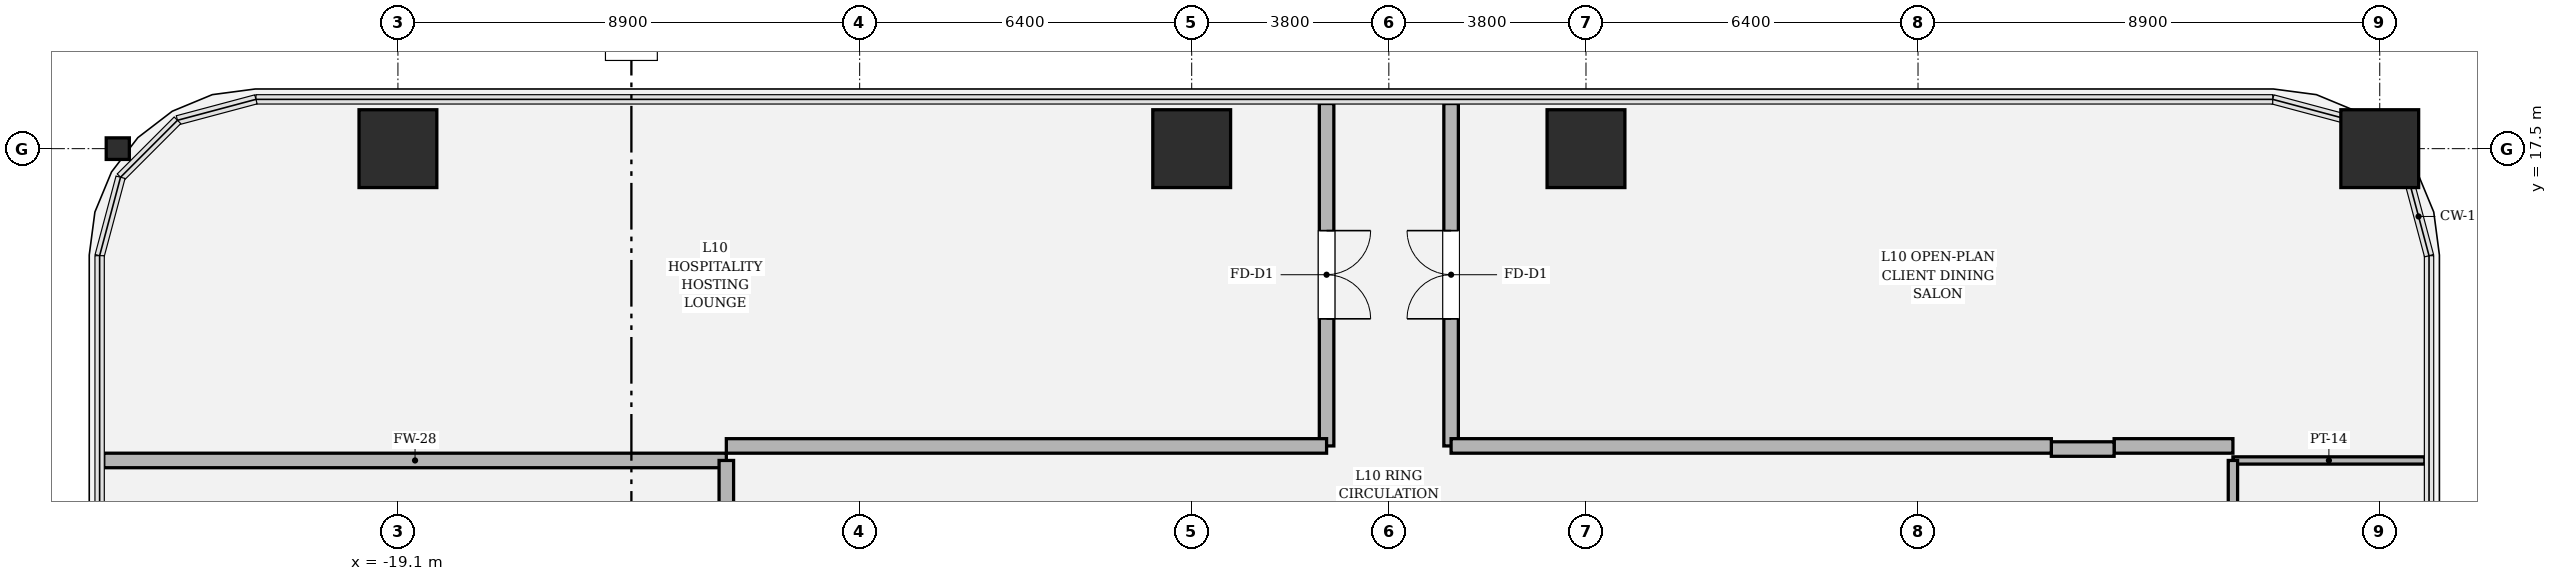
"""IFC4 building model, lengths in metres.
Left out: names, types, materials, properties, quantities, classifications, styles, units other than length and angle.
Written with IfcOpenShell. Run it as: python <this file> out.ifc"""

import sys

from ifc_helpers import new_model, si_unit, direction, frame, frame_2d, origin, origin_2d, place, context, subcontext, project, spatial, rectangle, hollow_rectangle, i_section, extrude, element, fill, save


model = new_model("IFC4")
c1 = context("Model", 3, precision=1e-05, world=origin(), true_north=direction((0.0, 1.0)))
c2 = subcontext(c1, "Body", "Model", "MODEL_VIEW")
j1 = project(units=[si_unit("LENGTHUNIT", "METRE"), si_unit("PLANEANGLEUNIT", "RADIAN")], contexts=[c1])
p1 = place(None, origin())
s1 = spatial("IfcSite", under=j1, at=p1, CompositionType="ELEMENT")
p2 = place(p1, origin())
s2 = spatial("IfcBuilding", under=s1, at=p2, CompositionType="ELEMENT")
p3 = place(p2, frame((0.0, 0.0, 48.45)))
s3 = spatial("IfcBuildingStorey", under=s2, at=p3, CompositionType="ELEMENT", Elevation=48.45)
for number, where, z_axis, x_axis in (
    (1, (19.1, 17.5, 0.0), (0.0, 0.0, 1.0), (1.0, 0.0, 0.0)),
    (2, (3.8, 17.5, 0.0), (0.0, 0.0, 1.0), (1.0, 0.0, 0.0)),
    (3, (-3.8, 17.5, 0.0), (0.0, 0.0, 1.0), (1.0, 0.0, 0.0)),
    (4, (-19.1, 17.5, 0.0), (0.0, 0.0, 1.0), (1.0, 0.0, 0.0)),
):
    element("IfcColumn", number, at=place(p3, frame(where, z_axis=z_axis, x_axis=x_axis)), inside=s3, PredefinedType="COLUMN", context=c2, shape_type="SweptSolid", body=[
        extrude(hollow_rectangle(XDim=1.5, YDim=1.5, WallThickness=0.045, at=origin_2d()), origin(), (0.0, 0.0, 1.0), 4.05),
    ])
p4 = place(p3, frame((-24.5, 17.5, 0.0), z_axis=(0.0, 0.0, 1.0), x_axis=(0.0, 1.0, 0.0)))
e5 = element("IfcColumn", 5, at=p4, inside=s3, PredefinedType="COLUMN", context=c2, shape_type="SweptSolid", body=[
    extrude(i_section(OverallWidth=0.416, OverallDepth=0.446, WebThickness=0.039, FlangeThickness=0.062, FilletRadius=0.018, at=origin_2d()), origin(), (0.0, 0.0, 1.0), 4.048),
])
p5 = place(p3, frame((16.27, 11.49, 0.0), z_axis=(0.0, 0.0, 1.0), x_axis=(1.0, 0.0, 0.0)))
e6 = element("IfcWall", 6, at=p5, inside=s3, PredefinedType="PARTITIONING", context=c2, shape_type="SweptSolid", body=[
    extrude(rectangle(XDim=3.7, YDim=0.14, at=frame_2d((1.85, 0.0))), origin(), (0.0, 0.0, 1.0), 3.104),
])
p6 = place(p3, frame((16.27, -3.174, 0.0), z_axis=(0.0, 0.0, 1.0), x_axis=(0.0, 1.0, 0.0)))
e7 = element("IfcWall", 7, at=p6, inside=s3, PredefinedType="PARTITIONING", context=c2, shape_type="SweptSolid", body=[
    extrude(rectangle(XDim=14.664, YDim=0.18, at=frame_2d((7.332, 0.0))), origin(), (0.0, 0.0, 1.0), 3.104),
])
p7 = place(p6, frame((6.807, 0.0, 0.0)))
e8 = element("IfcOpeningElement", 8, at=p7, cuts=e7, PredefinedType="OPENING", context=c2, shape_type="SweptSolid", body=[
    extrude(rectangle(XDim=1.05, YDim=2.2, at=frame_2d((0.525, 1.1))), frame((0.0, 0.1, 0.0), z_axis=(0.0, -1.0, 0.0), x_axis=(1.0, 0.0, 0.0)), (0.0, 0.0, 1.0), 0.2),
])
p8 = place(p3, frame((-24.77, 11.49, 0.0), z_axis=(0.0, 0.0, 1.0), x_axis=(1.0, 0.0, 0.0)))
e9 = element("IfcWall", 9, at=p8, inside=s3, PredefinedType="SOLIDWALL", context=c2, shape_type="SweptSolid", body=[
    extrude(rectangle(XDim=12.0, YDim=0.28, at=frame_2d((6.0, 0.0))), origin(), (0.0, 0.0, 1.0), 2.524),
])
p9 = place(p3, frame((-12.77, 11.49, 0.0), z_axis=(0.0, 0.0, 1.0), x_axis=(0.0, -1.0, 0.0)))
e10 = element("IfcWall", 10, at=p9, inside=s3, PredefinedType="SOLIDWALL", context=c2, shape_type="SweptSolid", body=[
    extrude(rectangle(XDim=7.272, YDim=0.28, at=frame_2d((3.636, 0.0))), origin(), (0.0, 0.0, 1.0), 3.104),
])
p10 = place(p9, frame((2.786, 0.0, 0.0)))
e11 = element("IfcOpeningElement", 11, at=p10, cuts=e10, PredefinedType="OPENING", context=c2, shape_type="SweptSolid", body=[
    extrude(rectangle(XDim=1.7, YDim=2.3, at=frame_2d((0.85, 1.15))), frame((0.0, 0.15, 0.0), z_axis=(0.0, -1.0, 0.0), x_axis=(1.0, 0.0, 0.0)), (0.0, 0.0, 1.0), 0.3),
])
p11 = place(p3, frame((-1.2, 18.37, 0.0), z_axis=(0.0, 0.0, 1.0), x_axis=(0.0, -1.0, 0.0)))
e12 = element("IfcWall", 12, at=p11, inside=s3, PredefinedType="SOLIDWALL", context=c2, shape_type="SweptSolid", body=[
    extrude(rectangle(XDim=6.6, YDim=0.28, at=frame_2d((3.3, 0.0))), origin(), (0.0, 0.0, 1.0), 3.104),
])
p12 = place(p11, frame((2.45, 0.0, 0.0)))
e13 = element("IfcOpeningElement", 13, at=p12, cuts=e12, PredefinedType="OPENING", context=c2, shape_type="SweptSolid", body=[
    extrude(rectangle(XDim=1.7, YDim=2.3, at=frame_2d((0.85, 1.15))), frame((0.0, 0.15, 0.0), z_axis=(0.0, -1.0, 0.0), x_axis=(1.0, 0.0, 0.0)), (0.0, 0.0, 1.0), 0.3),
])
p13 = place(p3, frame((-1.2, 11.77, 0.0), z_axis=(0.0, 0.0, 1.0), x_axis=(-1.0, 0.0, 0.0)))
e14 = element("IfcWall", 14, at=p13, inside=s3, PredefinedType="SOLIDWALL", context=c2, shape_type="SweptSolid", body=[
    extrude(rectangle(XDim=11.57, YDim=0.28, at=frame_2d((5.785, 0.0))), origin(), (0.0, 0.0, 1.0), 3.104),
])
p14 = place(p3, frame((1.2, 11.77, 0.0), z_axis=(0.0, 0.0, 1.0), x_axis=(0.0, 1.0, 0.0)))
e15 = element("IfcWall", 15, at=p14, inside=s3, PredefinedType="SOLIDWALL", context=c2, shape_type="SweptSolid", body=[
    extrude(rectangle(XDim=6.6, YDim=0.28, at=frame_2d((3.3, 0.0))), origin(), (0.0, 0.0, 1.0), 3.104),
])
p15 = place(p14, frame((2.45, 0.0, 0.0)))
e16 = element("IfcOpeningElement", 16, at=p15, cuts=e15, PredefinedType="OPENING", context=c2, shape_type="SweptSolid", body=[
    extrude(rectangle(XDim=1.7, YDim=2.3, at=frame_2d((0.85, 1.15))), frame((0.0, 0.15, 0.0), z_axis=(0.0, -1.0, 0.0), x_axis=(1.0, 0.0, 0.0)), (0.0, 0.0, 1.0), 0.3),
])
p16 = place(p3, frame((16.27, 11.77, 0.0), z_axis=(0.0, 0.0, 1.0), x_axis=(-1.0, 0.0, 0.0)))
e17 = element("IfcWall", 17, at=p16, inside=s3, PredefinedType="SOLIDWALL", context=c2, shape_type="SweptSolid", body=[
    extrude(rectangle(XDim=2.29, YDim=0.28, at=frame_2d((1.145, 0.0))), origin(), (0.0, 0.0, 1.0), 3.354),
])
p17 = place(p3, frame((13.98, 11.71, 0.0), z_axis=(0.0, 0.0, 1.0), x_axis=(-1.0, 0.0, 0.0)))
e18 = element("IfcWall", 18, at=p17, inside=s3, PredefinedType="SOLIDWALL", context=c2, shape_type="SweptSolid", body=[
    extrude(rectangle(XDim=1.21, YDim=0.28, at=frame_2d((0.605, 0.0))), origin(), (0.0, 0.0, 1.0), 3.81),
])
p18 = place(p3, frame((12.77, 11.77, 0.0), z_axis=(0.0, 0.0, 1.0), x_axis=(-1.0, 0.0, 0.0)))
e19 = element("IfcWall", 19, at=p18, inside=s3, PredefinedType="SOLIDWALL", context=c2, shape_type="SweptSolid", body=[
    extrude(rectangle(XDim=11.57, YDim=0.28, at=frame_2d((5.785, 0.0))), origin(), (0.0, 0.0, 1.0), 3.104),
])
p19 = place(p12, origin())
e20 = element("IfcDoor", 20, at=p19, inside=s3, OperationType="DOUBLE_DOOR_SINGLE_SWING", PredefinedType="DOOR", context=c2, shape_type="SweptSolid", body=[
    extrude(rectangle(XDim=1.7, YDim=2.3, at=frame_2d((0.85, 1.15))), frame((0.0, 0.025, 0.0), z_axis=(0.0, -1.0, 0.0), x_axis=(1.0, 0.0, 0.0)), (0.0, 0.0, 1.0), 0.05),
])
fill(e13, e20)
p20 = place(p15, origin())
e21 = element("IfcDoor", 21, at=p20, inside=s3, OperationType="DOUBLE_DOOR_SINGLE_SWING", PredefinedType="DOOR", context=c2, shape_type="SweptSolid", body=[
    extrude(rectangle(XDim=1.7, YDim=2.3, at=frame_2d((0.85, 1.15))), frame((0.0, 0.025, 0.0), z_axis=(0.0, -1.0, 0.0), x_axis=(1.0, 0.0, 0.0)), (0.0, 0.0, 1.0), 0.05),
])
fill(e16, e21)
save(model, sys.argv[1])
